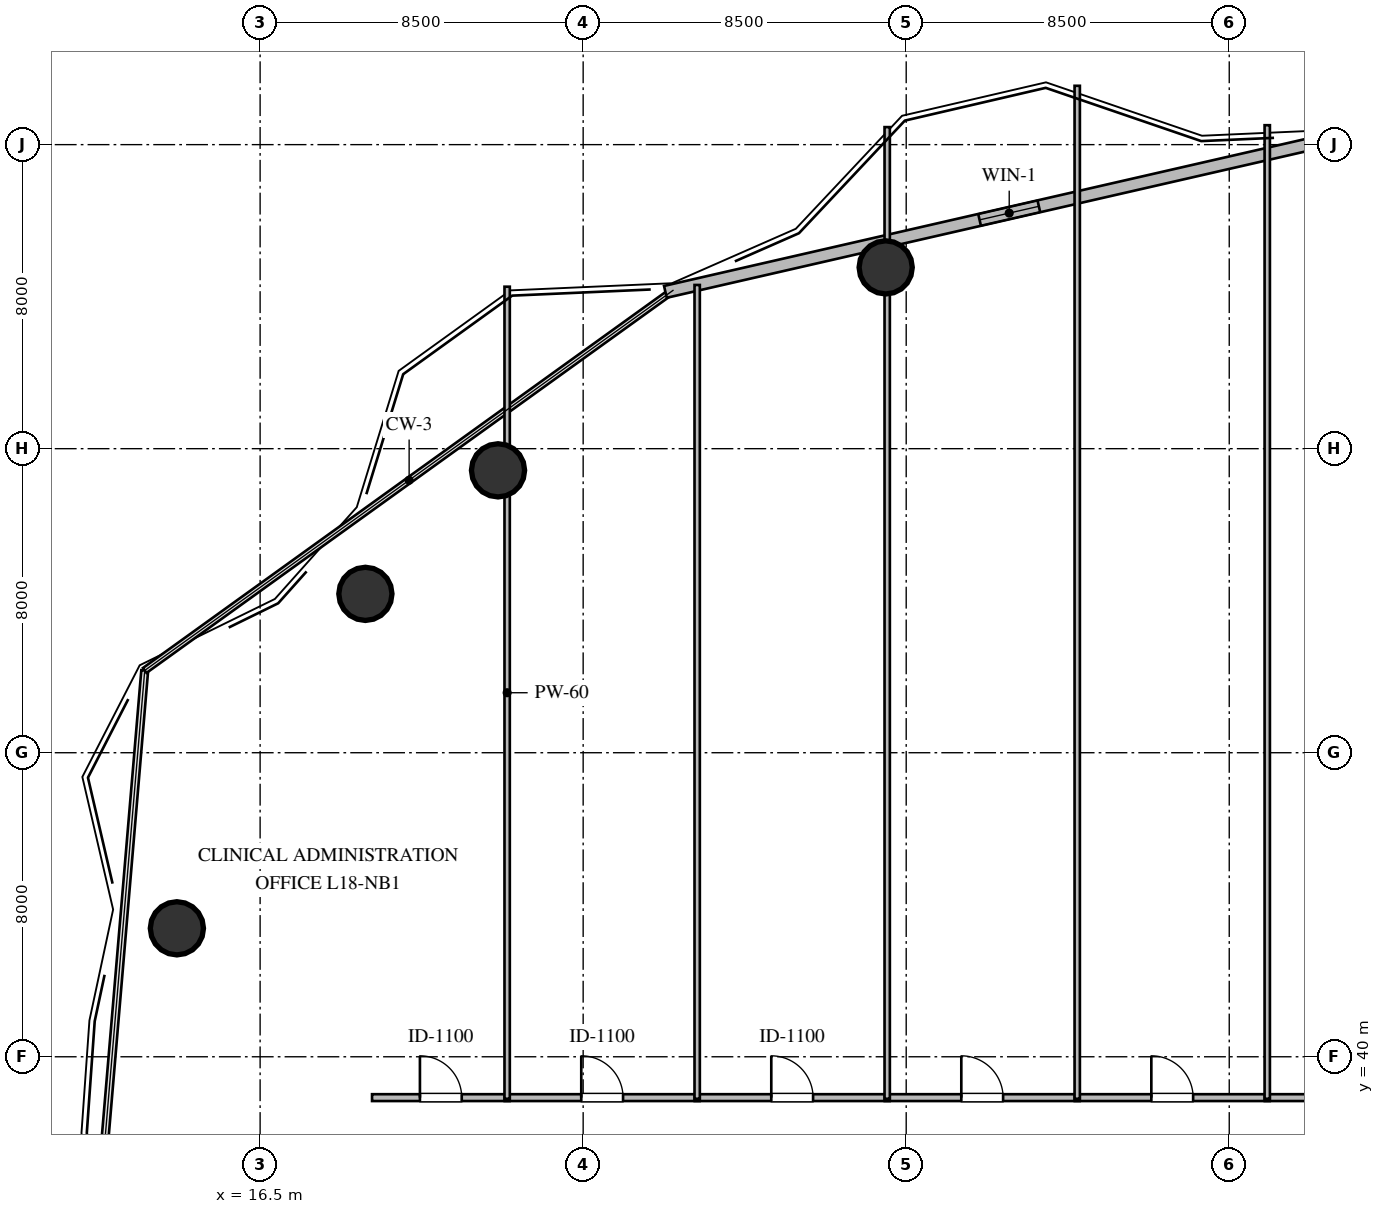
"""IFC4 building model, lengths in metres.
Left out: names, types, materials, properties, quantities, classifications, styles, units other than length and angle.
Written with IfcOpenShell. Run it as: python <this file> out.ifc"""

import sys

from ifc_helpers import new_model, si_unit, direction, frame, frame_2d, origin, origin_2d, place, context, subcontext, project, spatial, rectangle, circle, extrude, element, fill, save


model = new_model("IFC4")
c1 = context("Model", 3, precision=1e-05, world=origin(), true_north=direction((0.0, 1.0)))
c2 = subcontext(c1, "Body", "Model", "MODEL_VIEW")
j1 = project(units=[si_unit("LENGTHUNIT", "METRE"), si_unit("PLANEANGLEUNIT", "RADIAN")], contexts=[c1])
p1 = place(None, origin())
s1 = spatial("IfcSite", under=j1, at=p1, CompositionType="ELEMENT")
p2 = place(p1, origin())
s2 = spatial("IfcBuilding", under=s1, at=p2, CompositionType="ELEMENT")
p3 = place(p2, frame((0.0, 0.0, 70.8)))
s3 = spatial("IfcBuildingStorey", under=s2, at=p3, CompositionType="ELEMENT", Elevation=70.8)
for number, where, z_axis, x_axis in (
    (1, (32.96, 60.77, 0.0), (0.0, 0.0, 1.0), (1.0, 0.0, 0.0)),
    (2, (22.76, 55.43, 0.0), (0.0, 0.0, 1.0), (1.0, 0.0, 0.0)),
    (3, (19.27, 52.18, 0.0), (0.0, 0.0, 1.0), (1.0, 0.0, 0.0)),
    (4, (14.31, 43.38, 0.0), (0.0, 0.0, 1.0), (1.0, 0.0, 0.0)),
):
    element("IfcColumn", number, at=place(p3, frame(where, z_axis=z_axis, x_axis=x_axis)), inside=s3, PredefinedType="COLUMN", context=c2, shape_type="SweptSolid", body=[
        extrude(circle(Radius=0.7, at=origin_2d()), origin(), (0.0, 0.0, 1.0), 3.6),
    ])
p4 = place(p3, frame((27.164, 60.126, 0.0), z_axis=(0.0, 0.0, 1.0), x_axis=(0.974744906433, 0.22332122018, 0.0)))
e5 = element("IfcWall", 5, at=p4, inside=s3, PredefinedType="STANDARD", context=c2, shape_type="SweptSolid", body=[
    extrude(rectangle(XDim=18.561, YDim=0.32, at=frame_2d((9.28, 0.0))), origin(), (0.0, 0.0, 1.0), 3.36),
])
p5 = place(p4, frame((8.481, 0.0, 1.05)))
e6 = element("IfcOpeningElement", 6, at=p5, cuts=e5, PredefinedType="OPENING", context=c2, shape_type="SweptSolid", body=[
    extrude(rectangle(XDim=1.6, YDim=1.5, at=frame_2d((0.8, 0.75))), frame((0.0, 0.17, 0.0), z_axis=(0.0, -1.0, 0.0), x_axis=(1.0, 0.0, 0.0)), (0.0, 0.0, 1.0), 0.34),
])
p6 = place(p3, frame((19.445, 38.925, 0.0), z_axis=(0.0, 0.0, 1.0), x_axis=(1.0, 0.0, 0.0)))
e7 = element("IfcWall", 7, at=p6, inside=s3, PredefinedType="PARTITIONING", context=c2, shape_type="SweptSolid", body=[
    extrude(rectangle(XDim=3.62, YDim=0.18, at=frame_2d((1.81, 0.0))), origin(), (0.0, 0.0, 1.0), 3.36),
])
p7 = place(p6, frame((1.26, 0.0, 0.0)))
e8 = element("IfcOpeningElement", 8, at=p7, cuts=e7, PredefinedType="OPENING", context=c2, shape_type="SweptSolid", body=[
    extrude(rectangle(XDim=1.1, YDim=2.1, at=frame_2d((0.55, 1.05))), frame((0.0, 0.1, 0.0), z_axis=(0.0, -1.0, 0.0), x_axis=(1.0, 0.0, 0.0)), (0.0, 0.0, 1.0), 0.2),
])
p8 = place(p3, frame((22.935, 38.925, 0.0), z_axis=(0.0, 0.0, 1.0), x_axis=(1.0, 0.0, 0.0)))
e9 = element("IfcWall", 9, at=p8, inside=s3, PredefinedType="PARTITIONING", context=c2, shape_type="SweptSolid", body=[
    extrude(rectangle(XDim=5.13, YDim=0.18, at=frame_2d((2.565, 0.0))), origin(), (0.0, 0.0, 1.0), 3.36),
])
p9 = place(p8, frame((2.015, 0.0, 0.0)))
e10 = element("IfcOpeningElement", 10, at=p9, cuts=e9, PredefinedType="OPENING", context=c2, shape_type="SweptSolid", body=[
    extrude(rectangle(XDim=1.1, YDim=2.1, at=frame_2d((0.55, 1.05))), frame((0.0, 0.1, 0.0), z_axis=(0.0, -1.0, 0.0), x_axis=(1.0, 0.0, 0.0)), (0.0, 0.0, 1.0), 0.2),
])
p10 = place(p3, frame((27.935, 38.925, 0.0), z_axis=(0.0, 0.0, 1.0), x_axis=(1.0, 0.0, 0.0)))
e11 = element("IfcWall", 11, at=p10, inside=s3, PredefinedType="PARTITIONING", context=c2, shape_type="SweptSolid", body=[
    extrude(rectangle(XDim=5.13, YDim=0.18, at=frame_2d((2.565, 0.0))), origin(), (0.0, 0.0, 1.0), 3.36),
])
p11 = place(p10, frame((2.015, 0.0, 0.0)))
e12 = element("IfcOpeningElement", 12, at=p11, cuts=e11, PredefinedType="OPENING", context=c2, shape_type="SweptSolid", body=[
    extrude(rectangle(XDim=1.1, YDim=2.1, at=frame_2d((0.55, 1.05))), frame((0.0, 0.1, 0.0), z_axis=(0.0, -1.0, 0.0), x_axis=(1.0, 0.0, 0.0)), (0.0, 0.0, 1.0), 0.2),
])
p12 = place(p3, frame((32.935, 38.925, 0.0), z_axis=(0.0, 0.0, 1.0), x_axis=(1.0, 0.0, 0.0)))
e13 = element("IfcWall", 13, at=p12, inside=s3, PredefinedType="PARTITIONING", context=c2, shape_type="SweptSolid", body=[
    extrude(rectangle(XDim=5.13, YDim=0.18, at=frame_2d((2.565, 0.0))), origin(), (0.0, 0.0, 1.0), 3.36),
])
p13 = place(p12, frame((2.015, 0.0, 0.0)))
e14 = element("IfcOpeningElement", 14, at=p13, cuts=e13, PredefinedType="OPENING", context=c2, shape_type="SweptSolid", body=[
    extrude(rectangle(XDim=1.1, YDim=2.1, at=frame_2d((0.55, 1.05))), frame((0.0, 0.1, 0.0), z_axis=(0.0, -1.0, 0.0), x_axis=(1.0, 0.0, 0.0)), (0.0, 0.0, 1.0), 0.2),
])
p14 = place(p3, frame((37.935, 38.925, 0.0), z_axis=(0.0, 0.0, 1.0), x_axis=(1.0, 0.0, 0.0)))
e15 = element("IfcWall", 15, at=p14, inside=s3, PredefinedType="PARTITIONING", context=c2, shape_type="SweptSolid", body=[
    extrude(rectangle(XDim=5.13, YDim=0.18, at=frame_2d((2.565, 0.0))), origin(), (0.0, 0.0, 1.0), 3.36),
])
p15 = place(p14, frame((2.015, 0.0, 0.0)))
e16 = element("IfcOpeningElement", 16, at=p15, cuts=e15, PredefinedType="OPENING", context=c2, shape_type="SweptSolid", body=[
    extrude(rectangle(XDim=1.1, YDim=2.1, at=frame_2d((0.55, 1.05))), frame((0.0, 0.1, 0.0), z_axis=(0.0, -1.0, 0.0), x_axis=(1.0, 0.0, 0.0)), (0.0, 0.0, 1.0), 0.2),
])
p16 = place(p3, frame((42.935, 38.925, 0.0), z_axis=(0.0, 0.0, 1.0), x_axis=(1.0, 0.0, 0.0)))
e17 = element("IfcWall", 17, at=p16, inside=s3, PredefinedType="PARTITIONING", context=c2, shape_type="SweptSolid", body=[
    extrude(rectangle(XDim=3.62, YDim=0.18, at=frame_2d((1.81, 0.0))), origin(), (0.0, 0.0, 1.0), 3.36),
])
p17 = place(p16, frame((1.26, 0.0, 0.0)))
e18 = element("IfcOpeningElement", 18, at=p17, cuts=e17, PredefinedType="OPENING", context=c2, shape_type="SweptSolid", body=[
    extrude(rectangle(XDim=1.1, YDim=2.1, at=frame_2d((0.55, 1.05))), frame((0.0, 0.1, 0.0), z_axis=(0.0, -1.0, 0.0), x_axis=(1.0, 0.0, 0.0)), (0.0, 0.0, 1.0), 0.2),
])
p18 = place(p3, frame((23.0, 60.262, 0.0), z_axis=(0.0, 0.0, 1.0), x_axis=(0.0, -1.0, 0.0)))
e19 = element("IfcWall", 19, at=p18, inside=s3, PredefinedType="PARTITIONING", context=c2, shape_type="SweptSolid", body=[
    extrude(rectangle(XDim=21.367, YDim=0.14, at=frame_2d((10.684, 0.0))), origin(), (0.0, 0.0, 1.0), 2.806),
])
p19 = place(p3, frame((28.0, 60.308, 0.0), z_axis=(0.0, 0.0, 1.0), x_axis=(0.0, -1.0, 0.0)))
e20 = element("IfcWall", 20, at=p19, inside=s3, PredefinedType="PARTITIONING", context=c2, shape_type="SweptSolid", body=[
    extrude(rectangle(XDim=21.413, YDim=0.14, at=frame_2d((10.706, 0.0))), origin(), (0.0, 0.0, 1.0), 3.36),
])
p20 = place(p3, frame((33.0, 64.461, 0.0), z_axis=(0.0, 0.0, 1.0), x_axis=(0.0, -1.0, 0.0)))
e21 = element("IfcWall", 21, at=p20, inside=s3, PredefinedType="PARTITIONING", context=c2, shape_type="SweptSolid", body=[
    extrude(rectangle(XDim=25.566, YDim=0.14, at=frame_2d((12.783, 0.0))), origin(), (0.0, 0.0, 1.0), 2.806),
])
p21 = place(p3, frame((38.0, 65.548, 0.0), z_axis=(0.0, 0.0, 1.0), x_axis=(0.0, -1.0, 0.0)))
e22 = element("IfcWall", 22, at=p21, inside=s3, PredefinedType="PARTITIONING", context=c2, shape_type="SweptSolid", body=[
    extrude(rectangle(XDim=26.653, YDim=0.14, at=frame_2d((13.327, 0.0))), origin(), (0.0, 0.0, 1.0), 3.36),
])
p22 = place(p3, frame((43.0, 64.511, 0.0), z_axis=(0.0, 0.0, 1.0), x_axis=(0.0, -1.0, 0.0)))
e23 = element("IfcWall", 23, at=p22, inside=s3, PredefinedType="PARTITIONING", context=c2, shape_type="SweptSolid", body=[
    extrude(rectangle(XDim=25.616, YDim=0.14, at=frame_2d((12.808, 0.0))), origin(), (0.0, 0.0, 1.0), 3.36),
])
p23 = place(p5, origin())
e24 = element("IfcWindow", 24, at=p23, inside=s3, PartitioningType="SINGLE_PANEL", PredefinedType="WINDOW", context=c2, shape_type="SweptSolid", body=[
    extrude(rectangle(XDim=1.6, YDim=1.5, at=frame_2d((0.8, 0.75))), frame((0.0, 0.03, 0.0), z_axis=(0.0, -1.0, 0.0), x_axis=(1.0, 0.0, 0.0)), (0.0, 0.0, 1.0), 0.06),
])
fill(e6, e24)
p24 = place(p7, origin())
e25 = element("IfcDoor", 25, at=p24, inside=s3, OperationType="SINGLE_SWING_LEFT", PredefinedType="DOOR", context=c2, shape_type="SweptSolid", body=[
    extrude(rectangle(XDim=1.1, YDim=2.1, at=frame_2d((0.55, 1.05))), frame((0.0, 0.025, 0.0), z_axis=(0.0, -1.0, 0.0), x_axis=(1.0, 0.0, 0.0)), (0.0, 0.0, 1.0), 0.05),
])
fill(e8, e25)
p25 = place(p9, origin())
e26 = element("IfcDoor", 26, at=p25, inside=s3, OperationType="SINGLE_SWING_LEFT", PredefinedType="DOOR", context=c2, shape_type="SweptSolid", body=[
    extrude(rectangle(XDim=1.1, YDim=2.1, at=frame_2d((0.55, 1.05))), frame((0.0, 0.025, 0.0), z_axis=(0.0, -1.0, 0.0), x_axis=(1.0, 0.0, 0.0)), (0.0, 0.0, 1.0), 0.05),
])
fill(e10, e26)
p26 = place(p11, origin())
e27 = element("IfcDoor", 27, at=p26, inside=s3, OperationType="SINGLE_SWING_LEFT", PredefinedType="DOOR", context=c2, shape_type="SweptSolid", body=[
    extrude(rectangle(XDim=1.1, YDim=2.1, at=frame_2d((0.55, 1.05))), frame((0.0, 0.025, 0.0), z_axis=(0.0, -1.0, 0.0), x_axis=(1.0, 0.0, 0.0)), (0.0, 0.0, 1.0), 0.05),
])
fill(e12, e27)
p27 = place(p13, origin())
e28 = element("IfcDoor", 28, at=p27, inside=s3, OperationType="SINGLE_SWING_LEFT", PredefinedType="DOOR", context=c2, shape_type="SweptSolid", body=[
    extrude(rectangle(XDim=1.1, YDim=2.1, at=frame_2d((0.55, 1.05))), frame((0.0, 0.025, 0.0), z_axis=(0.0, -1.0, 0.0), x_axis=(1.0, 0.0, 0.0)), (0.0, 0.0, 1.0), 0.05),
])
fill(e14, e28)
p28 = place(p15, origin())
e29 = element("IfcDoor", 29, at=p28, inside=s3, OperationType="SINGLE_SWING_LEFT", PredefinedType="DOOR", context=c2, shape_type="SweptSolid", body=[
    extrude(rectangle(XDim=1.1, YDim=2.1, at=frame_2d((0.55, 1.05))), frame((0.0, 0.025, 0.0), z_axis=(0.0, -1.0, 0.0), x_axis=(1.0, 0.0, 0.0)), (0.0, 0.0, 1.0), 0.05),
])
fill(e16, e29)
save(model, sys.argv[1])
